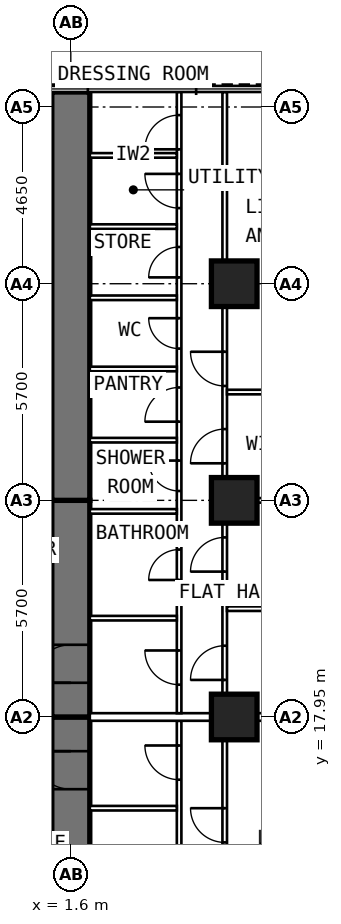
"""IFC4 building model, lengths in metres.
Left out: names, types, materials, properties, quantities, classifications, styles, units other than length and angle.
Written with IfcOpenShell. Run it as: python <this file> out.ifc"""

import sys

from ifc_helpers import new_model, si_unit, direction, frame, frame_2d, origin, origin_2d, place, context, subcontext, project, spatial, rectangle, extrude, element, fill, save


model = new_model("IFC4")
c1 = context("Model", 3, precision=1e-05, world=origin(), true_north=direction((0.0, 1.0)))
c2 = subcontext(c1, "Body", "Model", "MODEL_VIEW")
j1 = project(units=[si_unit("LENGTHUNIT", "METRE"), si_unit("PLANEANGLEUNIT", "RADIAN")], contexts=[c1])
p1 = place(None, origin())
s1 = spatial("IfcSite", under=j1, at=p1, CompositionType="ELEMENT")
p2 = place(p1, origin())
s2 = spatial("IfcBuilding", under=s1, at=p2, CompositionType="ELEMENT")
p3 = place(p2, frame((0.0, 0.0, 98.8)))
s3 = spatial("IfcBuildingStorey", under=s2, at=p3, CompositionType="ELEMENT", Elevation=98.8)
for number, where, z_axis, x_axis in (
    (1, (5.9, 17.95, 0.0), (0.0, 0.0, 1.0), (0.0, 1.0, 0.0)),
    (2, (5.9, 23.65, 0.0), (0.0, 0.0, 1.0), (0.0, 1.0, 0.0)),
    (3, (5.9, 29.35, 0.0), (0.0, 0.0, 1.0), (0.0, 1.0, 0.0)),
):
    element("IfcColumn", number, at=place(p3, frame(where, z_axis=z_axis, x_axis=x_axis)), inside=s3, PredefinedType="COLUMN", context=c2, shape_type="SweptSolid", body=[
        extrude(rectangle(XDim=1.2, YDim=1.2, at=origin_2d()), origin(), (0.0, 0.0, 1.0), 3.6),
    ])
p4 = place(p3, frame((1.6, 9.6, 0.0), z_axis=(0.0, 0.0, 1.0), x_axis=(0.0, 1.0, 0.0)))
e4 = element("IfcWall", 4, at=p4, inside=s3, PredefinedType="SHEAR", context=c2, shape_type="SweptSolid", body=[
    extrude(rectangle(XDim=8.35, YDim=1.0, at=frame_2d((4.175, 0.0))), origin(), (0.0, 0.0, 1.0), 3.6),
])
p5 = place(p4, frame((6.45, 0.0, 0.0)))
e5 = element("IfcOpeningElement", 5, at=p5, cuts=e4, PredefinedType="OPENING", context=c2, shape_type="SweptSolid", body=[
    extrude(rectangle(XDim=1.0, YDim=2.1, at=frame_2d((0.5, 1.05))), frame((0.0, 0.512, 0.0), z_axis=(0.0, -1.0, 0.0), x_axis=(1.0, 0.0, 0.0)), (0.0, 0.0, 1.0), 1.024),
])
p6 = place(p3, frame((1.6, 17.95, 0.0), z_axis=(0.0, 0.0, 1.0), x_axis=(0.0, 1.0, 0.0)))
e6 = element("IfcWall", 6, at=p6, inside=s3, PredefinedType="SHEAR", context=c2, shape_type="SweptSolid", body=[
    extrude(rectangle(XDim=5.7, YDim=1.0, at=frame_2d((2.85, 0.0))), origin(), (0.0, 0.0, 1.0), 3.6),
])
p7 = place(p6, frame((0.9, 0.0, 0.0)))
e7 = element("IfcOpeningElement", 7, at=p7, cuts=e6, PredefinedType="OPENING", context=c2, shape_type="SweptSolid", body=[
    extrude(rectangle(XDim=1.0, YDim=2.1, at=frame_2d((0.5, 1.05))), frame((0.0, 0.512, 0.0), z_axis=(0.0, -1.0, 0.0), x_axis=(1.0, 0.0, 0.0)), (0.0, 0.0, 1.0), 1.024),
])
p8 = place(p3, frame((1.6, 23.65, 0.0), z_axis=(0.0, 0.0, 1.0), x_axis=(0.0, 1.0, 0.0)))
e8 = element("IfcWall", 8, at=p8, inside=s3, PredefinedType="SHEAR", context=c2, shape_type="SweptSolid", body=[
    extrude(rectangle(XDim=10.745, YDim=1.0, at=frame_2d((5.373, 0.0))), origin(), (0.0, 0.0, 1.0), 3.6),
])
p9 = place(p3, frame((4.45, 10.1, 0.0), z_axis=(0.0, 0.0, 1.0), x_axis=(0.0, 1.0, 0.0)))
e9 = element("IfcWall", 9, at=p9, inside=s3, PredefinedType="PARTITIONING", context=c2, shape_type="SweptSolid", body=[
    extrude(rectangle(XDim=7.75, YDim=0.12, at=frame_2d((3.875, 0.0))), origin(), (0.0, 0.0, 1.0), 3.35),
])
p10 = place(p9, frame((0.56, 0.0, 0.0)))
e10 = element("IfcOpeningElement", 10, at=p10, cuts=e9, PredefinedType="OPENING", context=c2, shape_type="SweptSolid", body=[
    extrude(rectangle(XDim=0.9, YDim=2.1, at=frame_2d((0.45, 1.05))), frame((0.0, 0.072, 0.0), z_axis=(0.0, -1.0, 0.0), x_axis=(1.0, 0.0, 0.0)), (0.0, 0.0, 1.0), 0.144),
])
p11 = place(p9, frame((3.385, 0.0, 0.0)))
e11 = element("IfcOpeningElement", 11, at=p11, cuts=e9, PredefinedType="OPENING", context=c2, shape_type="SweptSolid", body=[
    extrude(rectangle(XDim=0.8, YDim=2.1, at=frame_2d((0.4, 1.05))), frame((0.0, 0.072, 0.0), z_axis=(0.0, -1.0, 0.0), x_axis=(1.0, 0.0, 0.0)), (0.0, 0.0, 1.0), 0.144),
])
p12 = place(p9, frame((6.2, 0.0, 0.0)))
e12 = element("IfcOpeningElement", 12, at=p12, cuts=e9, PredefinedType="OPENING", context=c2, shape_type="SweptSolid", body=[
    extrude(rectangle(XDim=0.9, YDim=2.1, at=frame_2d((0.45, 1.05))), frame((0.0, 0.072, 0.0), z_axis=(0.0, -1.0, 0.0), x_axis=(1.0, 0.0, 0.0)), (0.0, 0.0, 1.0), 0.144),
])
p13 = place(p3, frame((5.65, 9.6, 0.0), z_axis=(0.0, 0.0, 1.0), x_axis=(0.0, 1.0, 0.0)))
e13 = element("IfcWall", 13, at=p13, inside=s3, PredefinedType="PARTITIONING", context=c2, shape_type="SweptSolid", body=[
    extrude(rectangle(XDim=8.1, YDim=0.12, at=frame_2d((4.05, 0.0))), origin(), (0.0, 0.0, 1.0), 3.35),
])
p14 = place(p13, frame((5.05, 0.0, 0.0)))
e14 = element("IfcOpeningElement", 14, at=p14, cuts=e13, PredefinedType="OPENING", context=c2, shape_type="SweptSolid", body=[
    extrude(rectangle(XDim=0.9, YDim=2.1, at=frame_2d((0.45, 1.05))), frame((0.0, 0.072, 0.0), z_axis=(0.0, -1.0, 0.0), x_axis=(1.0, 0.0, 0.0)), (0.0, 0.0, 1.0), 0.144),
])
p15 = place(p3, frame((2.1, 15.55, 0.0), z_axis=(0.0, 0.0, 1.0), x_axis=(1.0, 0.0, 0.0)))
e15 = element("IfcWall", 15, at=p15, inside=s3, PredefinedType="PARTITIONING", context=c2, shape_type="SweptSolid", body=[
    extrude(rectangle(XDim=2.29, YDim=0.12, at=frame_2d((1.145, 0.0))), origin(), (0.0, 0.0, 1.0), 3.35),
])
p16 = place(p3, frame((4.45, 18.05, 0.0), z_axis=(0.0, 0.0, 1.0), x_axis=(0.0, 1.0, 0.0)))
e16 = element("IfcWall", 16, at=p16, inside=s3, PredefinedType="PARTITIONING", context=c2, shape_type="SweptSolid", body=[
    extrude(rectangle(XDim=16.345, YDim=0.12, at=frame_2d((8.172, 0.0))), origin(), (0.0, 0.0, 1.0), 3.35),
])
p17 = place(p16, frame((0.75, 0.0, 0.0)))
e17 = element("IfcOpeningElement", 17, at=p17, cuts=e16, PredefinedType="OPENING", context=c2, shape_type="SweptSolid", body=[
    extrude(rectangle(XDim=0.9, YDim=2.1, at=frame_2d((0.45, 1.05))), frame((0.0, 0.072, 0.0), z_axis=(0.0, -1.0, 0.0), x_axis=(1.0, 0.0, 0.0)), (0.0, 0.0, 1.0), 0.144),
])
p18 = place(p16, frame((3.505, 0.0, 0.0)))
e18 = element("IfcOpeningElement", 18, at=p18, cuts=e16, PredefinedType="OPENING", context=c2, shape_type="SweptSolid", body=[
    extrude(rectangle(XDim=0.8, YDim=2.1, at=frame_2d((0.4, 1.05))), frame((0.0, 0.072, 0.0), z_axis=(0.0, -1.0, 0.0), x_axis=(1.0, 0.0, 0.0)), (0.0, 0.0, 1.0), 0.144),
])
p19 = place(p16, frame((5.847, 0.0, 0.0)))
e19 = element("IfcOpeningElement", 19, at=p19, cuts=e16, PredefinedType="OPENING", context=c2, shape_type="SweptSolid", body=[
    extrude(rectangle(XDim=0.8, YDim=2.1, at=frame_2d((0.4, 1.05))), frame((0.0, 0.072, 0.0), z_axis=(0.0, -1.0, 0.0), x_axis=(1.0, 0.0, 0.0)), (0.0, 0.0, 1.0), 0.144),
])
p20 = place(p16, frame((7.67, 0.0, 0.0)))
e20 = element("IfcOpeningElement", 20, at=p20, cuts=e16, PredefinedType="OPENING", context=c2, shape_type="SweptSolid", body=[
    extrude(rectangle(XDim=0.9, YDim=2.1, at=frame_2d((0.45, 1.05))), frame((0.0, 0.072, 0.0), z_axis=(0.0, -1.0, 0.0), x_axis=(1.0, 0.0, 0.0)), (0.0, 0.0, 1.0), 0.144),
])
p21 = place(p16, frame((9.593, 0.0, 0.0)))
e21 = element("IfcOpeningElement", 21, at=p21, cuts=e16, PredefinedType="OPENING", context=c2, shape_type="SweptSolid", body=[
    extrude(rectangle(XDim=0.8, YDim=2.1, at=frame_2d((0.4, 1.05))), frame((0.0, 0.072, 0.0), z_axis=(0.0, -1.0, 0.0), x_axis=(1.0, 0.0, 0.0)), (0.0, 0.0, 1.0), 0.144),
])
p22 = place(p16, frame((11.467, 0.0, 0.0)))
e22 = element("IfcOpeningElement", 22, at=p22, cuts=e16, PredefinedType="OPENING", context=c2, shape_type="SweptSolid", body=[
    extrude(rectangle(XDim=0.8, YDim=2.1, at=frame_2d((0.4, 1.05))), frame((0.0, 0.072, 0.0), z_axis=(0.0, -1.0, 0.0), x_axis=(1.0, 0.0, 0.0)), (0.0, 0.0, 1.0), 0.144),
])
p23 = place(p16, frame((13.29, 0.0, 0.0)))
e23 = element("IfcOpeningElement", 23, at=p23, cuts=e16, PredefinedType="OPENING", context=c2, shape_type="SweptSolid", body=[
    extrude(rectangle(XDim=0.9, YDim=2.1, at=frame_2d((0.45, 1.05))), frame((0.0, 0.072, 0.0), z_axis=(0.0, -1.0, 0.0), x_axis=(1.0, 0.0, 0.0)), (0.0, 0.0, 1.0), 0.144),
])
p24 = place(p16, frame((14.837, 0.0, 0.0)))
e24 = element("IfcOpeningElement", 24, at=p24, cuts=e16, PredefinedType="OPENING", context=c2, shape_type="SweptSolid", body=[
    extrude(rectangle(XDim=0.9, YDim=2.1, at=frame_2d((0.45, 1.05))), frame((0.0, 0.072, 0.0), z_axis=(0.0, -1.0, 0.0), x_axis=(1.0, 0.0, 0.0)), (0.0, 0.0, 1.0), 0.144),
])
p25 = place(p3, frame((5.65, 18.05, 0.0), z_axis=(0.0, 0.0, 1.0), x_axis=(0.0, 1.0, 0.0)))
e25 = element("IfcWall", 25, at=p25, inside=s3, PredefinedType="PARTITIONING", context=c2, shape_type="SweptSolid", body=[
    extrude(rectangle(XDim=16.345, YDim=0.12, at=frame_2d((8.172, 0.0))), origin(), (0.0, 0.0, 1.0), 3.35),
])
p26 = place(p25, frame((0.875, 0.0, 0.0)))
e26 = element("IfcOpeningElement", 26, at=p26, cuts=e25, PredefinedType="OPENING", context=c2, shape_type="SweptSolid", body=[
    extrude(rectangle(XDim=0.9, YDim=2.1, at=frame_2d((0.45, 1.05))), frame((0.0, 0.072, 0.0), z_axis=(0.0, -1.0, 0.0), x_axis=(1.0, 0.0, 0.0)), (0.0, 0.0, 1.0), 0.144),
])
p27 = place(p25, frame((3.725, 0.0, 0.0)))
e27 = element("IfcOpeningElement", 27, at=p27, cuts=e25, PredefinedType="OPENING", context=c2, shape_type="SweptSolid", body=[
    extrude(rectangle(XDim=0.9, YDim=2.1, at=frame_2d((0.45, 1.05))), frame((0.0, 0.072, 0.0), z_axis=(0.0, -1.0, 0.0), x_axis=(1.0, 0.0, 0.0)), (0.0, 0.0, 1.0), 0.144),
])
p28 = place(p25, frame((6.575, 0.0, 0.0)))
e28 = element("IfcOpeningElement", 28, at=p28, cuts=e25, PredefinedType="OPENING", context=c2, shape_type="SweptSolid", body=[
    extrude(rectangle(XDim=0.9, YDim=2.1, at=frame_2d((0.45, 1.05))), frame((0.0, 0.072, 0.0), z_axis=(0.0, -1.0, 0.0), x_axis=(1.0, 0.0, 0.0)), (0.0, 0.0, 1.0), 0.144),
])
p29 = place(p25, frame((8.61, 0.0, 0.0)))
e29 = element("IfcOpeningElement", 29, at=p29, cuts=e25, PredefinedType="OPENING", context=c2, shape_type="SweptSolid", body=[
    extrude(rectangle(XDim=0.9, YDim=2.1, at=frame_2d((0.45, 1.05))), frame((0.0, 0.072, 0.0), z_axis=(0.0, -1.0, 0.0), x_axis=(1.0, 0.0, 0.0)), (0.0, 0.0, 1.0), 0.144),
])
p30 = place(p3, frame((5.71, 20.8, 0.0), z_axis=(0.0, 0.0, 1.0), x_axis=(1.0, 0.0, 0.0)))
e30 = element("IfcWall", 30, at=p30, inside=s3, PredefinedType="PARTITIONING", context=c2, shape_type="SweptSolid", body=[
    extrude(rectangle(XDim=4.99, YDim=0.12, at=frame_2d((2.495, 0.0))), origin(), (0.0, 0.0, 1.0), 3.35),
])
p31 = place(p3, frame((5.71, 23.65, 0.0), z_axis=(0.0, 0.0, 1.0), x_axis=(1.0, 0.0, 0.0)))
e31 = element("IfcWall", 31, at=p31, inside=s3, PredefinedType="PARTITIONING", context=c2, shape_type="SweptSolid", body=[
    extrude(rectangle(XDim=4.99, YDim=0.12, at=frame_2d((2.495, 0.0))), origin(), (0.0, 0.0, 1.0), 2.45),
])
p32 = place(p3, frame((5.71, 26.5, 0.0), z_axis=(0.0, 0.0, 1.0), x_axis=(1.0, 0.0, 0.0)))
e32 = element("IfcWall", 32, at=p32, inside=s3, PredefinedType="PARTITIONING", context=c2, shape_type="SweptSolid", body=[
    extrude(rectangle(XDim=4.99, YDim=0.12, at=frame_2d((2.495, 0.0))), origin(), (0.0, 0.0, 1.0), 3.35),
])
p33 = place(p3, frame((2.1, 20.55, 0.0), z_axis=(0.0, 0.0, 1.0), x_axis=(1.0, 0.0, 0.0)))
e33 = element("IfcWall", 33, at=p33, inside=s3, PredefinedType="PARTITIONING", context=c2, shape_type="SweptSolid", body=[
    extrude(rectangle(XDim=2.29, YDim=0.12, at=frame_2d((1.145, 0.0))), origin(), (0.0, 0.0, 1.0), 3.35),
])
p34 = place(p3, frame((2.1, 23.36, 0.0), z_axis=(0.0, 0.0, 1.0), x_axis=(1.0, 0.0, 0.0)))
e34 = element("IfcWall", 34, at=p34, inside=s3, PredefinedType="PARTITIONING", context=c2, shape_type="SweptSolid", body=[
    extrude(rectangle(XDim=2.29, YDim=0.12, at=frame_2d((1.145, 0.0))), origin(), (0.0, 0.0, 1.0), 2.45),
])
for number, where, z_axis, x_axis in (
    (35, (2.1, 25.233, 0.0), (0.0, 0.0, 1.0), (1.0, 0.0, 0.0)),
    (36, (2.1, 27.107, 0.0), (0.0, 0.0, 1.0), (1.0, 0.0, 0.0)),
):
    element("IfcWall", number, at=place(p3, frame(where, z_axis=z_axis, x_axis=x_axis)), inside=s3, PredefinedType="PARTITIONING", context=c2, shape_type="SweptSolid", body=[
        extrude(rectangle(XDim=2.29, YDim=0.12, at=frame_2d((1.145, 0.0))), origin(), (0.0, 0.0, 1.0), 3.35),
    ])
p35 = place(p3, frame((2.1, 28.98, 0.0), z_axis=(0.0, 0.0, 1.0), x_axis=(1.0, 0.0, 0.0)))
e37 = element("IfcWall", 37, at=p35, inside=s3, PredefinedType="PARTITIONING", context=c2, shape_type="SweptSolid", body=[
    extrude(rectangle(XDim=2.29, YDim=0.12, at=frame_2d((1.145, 0.0))), origin(), (0.0, 0.0, 1.0), 2.45),
])
for number, where, z_axis, x_axis in (
    (38, (2.1, 30.853, 0.0), (0.0, 0.0, 1.0), (1.0, 0.0, 0.0)),
    (39, (2.1, 32.727, 0.0), (0.0, 0.0, 1.0), (1.0, 0.0, 0.0)),
):
    element("IfcWall", number, at=place(p3, frame(where, z_axis=z_axis, x_axis=x_axis)), inside=s3, PredefinedType="PARTITIONING", context=c2, shape_type="SweptSolid", body=[
        extrude(rectangle(XDim=2.29, YDim=0.12, at=frame_2d((1.145, 0.0))), origin(), (0.0, 0.0, 1.0), 3.35),
    ])
p36 = place(p3, frame((2.1, 17.95, 0.0), z_axis=(0.0, 0.0, 1.0), x_axis=(1.0, 0.0, 0.0)))
e40 = element("IfcWall", 40, at=p36, inside=s3, PredefinedType="PARTITIONING", context=c2, shape_type="SweptSolid", body=[
    extrude(rectangle(XDim=8.6, YDim=0.2, at=frame_2d((4.3, 0.0))), origin(), (0.0, 0.0, 1.0), 2.45),
])
p37 = place(p5, origin())
e41 = element("IfcDoor", 41, at=p37, inside=s3, OperationType="SINGLE_SWING_RIGHT", PredefinedType="DOOR", context=c2, shape_type="SweptSolid", body=[
    extrude(rectangle(XDim=1.0, YDim=2.1, at=frame_2d((0.5, 1.05))), frame((0.0, 0.25, 0.0), z_axis=(0.0, -1.0, 0.0), x_axis=(1.0, 0.0, 0.0)), (0.0, 0.0, 1.0), 0.5),
])
fill(e5, e41)
p38 = place(p14, origin())
e42 = element("IfcDoor", 42, at=p38, inside=s3, OperationType="SINGLE_SWING_RIGHT", PredefinedType="DOOR", context=c2, shape_type="SweptSolid", body=[
    extrude(rectangle(XDim=0.9, YDim=2.1, at=frame_2d((0.45, 1.05))), frame((0.0, 0.025, 0.0), z_axis=(0.0, -1.0, 0.0), x_axis=(1.0, 0.0, 0.0)), (0.0, 0.0, 1.0), 0.05),
])
fill(e14, e42)
p39 = place(p12, origin())
e43 = element("IfcDoor", 43, at=p39, inside=s3, OperationType="SINGLE_SWING_RIGHT", PredefinedType="DOOR", context=c2, shape_type="SweptSolid", body=[
    extrude(rectangle(XDim=0.9, YDim=2.1, at=frame_2d((0.45, 1.05))), frame((0.0, 0.025, 0.0), z_axis=(0.0, -1.0, 0.0), x_axis=(1.0, 0.0, 0.0)), (0.0, 0.0, 1.0), 0.05),
])
fill(e12, e43)
p40 = place(p7, origin())
e44 = element("IfcDoor", 44, at=p40, inside=s3, OperationType="SINGLE_SWING_LEFT", PredefinedType="DOOR", context=c2, shape_type="SweptSolid", body=[
    extrude(rectangle(XDim=1.0, YDim=2.1, at=frame_2d((0.5, 1.05))), frame((0.0, 0.25, 0.0), z_axis=(0.0, -1.0, 0.0), x_axis=(1.0, 0.0, 0.0)), (0.0, 0.0, 1.0), 0.5),
])
fill(e7, e44)
p41 = place(p26, origin())
e45 = element("IfcDoor", 45, at=p41, inside=s3, OperationType="SINGLE_SWING_LEFT", PredefinedType="DOOR", context=c2, shape_type="SweptSolid", body=[
    extrude(rectangle(XDim=0.9, YDim=2.1, at=frame_2d((0.45, 1.05))), frame((0.0, 0.025, 0.0), z_axis=(0.0, -1.0, 0.0), x_axis=(1.0, 0.0, 0.0)), (0.0, 0.0, 1.0), 0.05),
])
fill(e26, e45)
p42 = place(p27, origin())
e46 = element("IfcDoor", 46, at=p42, inside=s3, OperationType="SINGLE_SWING_LEFT", PredefinedType="DOOR", context=c2, shape_type="SweptSolid", body=[
    extrude(rectangle(XDim=0.9, YDim=2.1, at=frame_2d((0.45, 1.05))), frame((0.0, 0.025, 0.0), z_axis=(0.0, -1.0, 0.0), x_axis=(1.0, 0.0, 0.0)), (0.0, 0.0, 1.0), 0.05),
])
fill(e27, e46)
p43 = place(p28, origin())
e47 = element("IfcDoor", 47, at=p43, inside=s3, OperationType="SINGLE_SWING_LEFT", PredefinedType="DOOR", context=c2, shape_type="SweptSolid", body=[
    extrude(rectangle(XDim=0.9, YDim=2.1, at=frame_2d((0.45, 1.05))), frame((0.0, 0.025, 0.0), z_axis=(0.0, -1.0, 0.0), x_axis=(1.0, 0.0, 0.0)), (0.0, 0.0, 1.0), 0.05),
])
fill(e28, e47)
p44 = place(p29, origin())
e48 = element("IfcDoor", 48, at=p44, inside=s3, OperationType="SINGLE_SWING_RIGHT", PredefinedType="DOOR", context=c2, shape_type="SweptSolid", body=[
    extrude(rectangle(XDim=0.9, YDim=2.1, at=frame_2d((0.45, 1.05))), frame((0.0, 0.025, 0.0), z_axis=(0.0, -1.0, 0.0), x_axis=(1.0, 0.0, 0.0)), (0.0, 0.0, 1.0), 0.05),
])
fill(e29, e48)
p45 = place(p17, origin())
e49 = element("IfcDoor", 49, at=p45, inside=s3, OperationType="SINGLE_SWING_RIGHT", PredefinedType="DOOR", context=c2, shape_type="SweptSolid", body=[
    extrude(rectangle(XDim=0.9, YDim=2.1, at=frame_2d((0.45, 1.05))), frame((0.0, 0.025, 0.0), z_axis=(0.0, -1.0, 0.0), x_axis=(1.0, 0.0, 0.0)), (0.0, 0.0, 1.0), 0.05),
])
fill(e17, e49)
p46 = place(p18, origin())
e50 = element("IfcDoor", 50, at=p46, inside=s3, OperationType="SINGLE_SWING_LEFT", PredefinedType="DOOR", context=c2, shape_type="SweptSolid", body=[
    extrude(rectangle(XDim=0.8, YDim=2.1, at=frame_2d((0.4, 1.05))), frame((0.0, 0.025, 0.0), z_axis=(0.0, -1.0, 0.0), x_axis=(1.0, 0.0, 0.0)), (0.0, 0.0, 1.0), 0.05),
])
fill(e18, e50)
p47 = place(p19, origin())
e51 = element("IfcDoor", 51, at=p47, inside=s3, OperationType="SINGLE_SWING_RIGHT", PredefinedType="DOOR", context=c2, shape_type="SweptSolid", body=[
    extrude(rectangle(XDim=0.8, YDim=2.1, at=frame_2d((0.4, 1.05))), frame((0.0, 0.025, 0.0), z_axis=(0.0, -1.0, 0.0), x_axis=(1.0, 0.0, 0.0)), (0.0, 0.0, 1.0), 0.05),
])
fill(e19, e51)
p48 = place(p20, origin())
e52 = element("IfcDoor", 52, at=p48, inside=s3, OperationType="SINGLE_SWING_LEFT", PredefinedType="DOOR", context=c2, shape_type="SweptSolid", body=[
    extrude(rectangle(XDim=0.9, YDim=2.1, at=frame_2d((0.45, 1.05))), frame((0.0, 0.025, 0.0), z_axis=(0.0, -1.0, 0.0), x_axis=(1.0, 0.0, 0.0)), (0.0, 0.0, 1.0), 0.05),
])
fill(e20, e52)
p49 = place(p21, origin())
e53 = element("IfcDoor", 53, at=p49, inside=s3, OperationType="SINGLE_SWING_RIGHT", PredefinedType="DOOR", context=c2, shape_type="SweptSolid", body=[
    extrude(rectangle(XDim=0.8, YDim=2.1, at=frame_2d((0.4, 1.05))), frame((0.0, 0.025, 0.0), z_axis=(0.0, -1.0, 0.0), x_axis=(1.0, 0.0, 0.0)), (0.0, 0.0, 1.0), 0.05),
])
fill(e21, e53)
p50 = place(p22, origin())
e54 = element("IfcDoor", 54, at=p50, inside=s3, OperationType="SINGLE_SWING_LEFT", PredefinedType="DOOR", context=c2, shape_type="SweptSolid", body=[
    extrude(rectangle(XDim=0.8, YDim=2.1, at=frame_2d((0.4, 1.05))), frame((0.0, 0.025, 0.0), z_axis=(0.0, -1.0, 0.0), x_axis=(1.0, 0.0, 0.0)), (0.0, 0.0, 1.0), 0.05),
])
fill(e22, e54)
p51 = place(p23, origin())
e55 = element("IfcDoor", 55, at=p51, inside=s3, OperationType="SINGLE_SWING_RIGHT", PredefinedType="DOOR", context=c2, shape_type="SweptSolid", body=[
    extrude(rectangle(XDim=0.9, YDim=2.1, at=frame_2d((0.45, 1.05))), frame((0.0, 0.025, 0.0), z_axis=(0.0, -1.0, 0.0), x_axis=(1.0, 0.0, 0.0)), (0.0, 0.0, 1.0), 0.05),
])
fill(e23, e55)
p52 = place(p24, origin())
e56 = element("IfcDoor", 56, at=p52, inside=s3, OperationType="SINGLE_SWING_LEFT", PredefinedType="DOOR", context=c2, shape_type="SweptSolid", body=[
    extrude(rectangle(XDim=0.9, YDim=2.1, at=frame_2d((0.45, 1.05))), frame((0.0, 0.025, 0.0), z_axis=(0.0, -1.0, 0.0), x_axis=(1.0, 0.0, 0.0)), (0.0, 0.0, 1.0), 0.05),
])
fill(e24, e56)
save(model, sys.argv[1])
